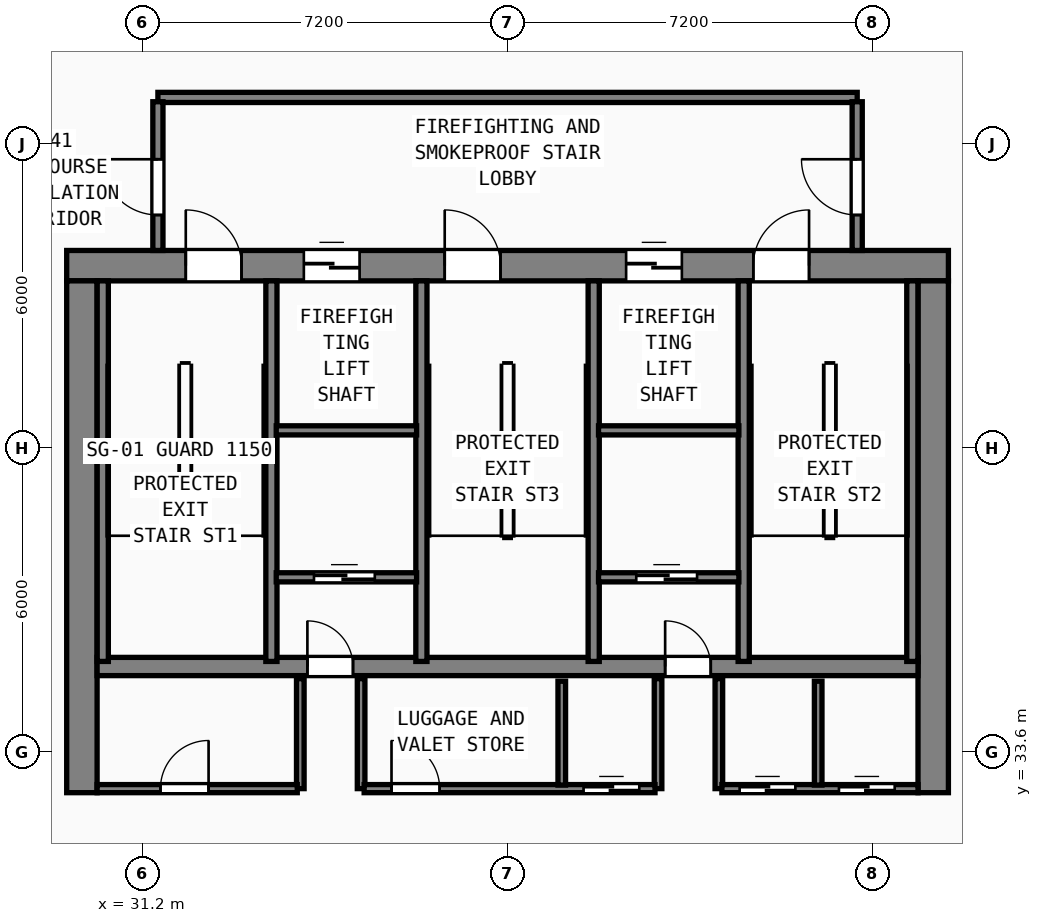
"""IFC4 building model, lengths in metres.
Left out: names, types, materials, properties, quantities, classifications, styles, units other than length and angle.
Written with IfcOpenShell. Run it as: python <this file> out.ifc"""

import sys

from ifc_helpers import new_model, si_unit, direction, frame, frame_2d, origin, place, context, subcontext, project, spatial, rectangle, extrude, element, fill, save


model = new_model("IFC4")
c1 = context("Model", 3, precision=1e-05, world=origin(), true_north=direction((0.0, 1.0)))
c2 = subcontext(c1, "Body", "Model", "MODEL_VIEW")
j1 = project(units=[si_unit("LENGTHUNIT", "METRE"), si_unit("PLANEANGLEUNIT", "RADIAN")], contexts=[c1])
p1 = place(None, origin())
s1 = spatial("IfcSite", under=j1, at=p1, CompositionType="ELEMENT")
p2 = place(p1, origin())
s2 = spatial("IfcBuilding", under=s1, at=p2, CompositionType="ELEMENT")
p3 = place(p2, frame((0.0, 0.0, 164.6)))
s3 = spatial("IfcBuildingStorey", under=s2, at=p3, CompositionType="ELEMENT", Elevation=164.6)
p4 = place(p3, frame((29.7, 43.2, 0.0), z_axis=(0.0, 0.0, 1.0), x_axis=(1.0, 0.0, 0.0)))
e1 = element("IfcWall", 1, at=p4, inside=s3, PredefinedType="SHEAR", context=c2, shape_type="SweptSolid", body=[
    extrude(rectangle(XDim=17.4, YDim=0.6, at=frame_2d((8.7, 0.0))), origin(), (0.0, 0.0, 1.0), 4.22),
])
p5 = place(p4, frame((2.35, 0.0, 0.0)))
e2 = element("IfcOpeningElement", 2, at=p5, cuts=e1, PredefinedType="OPENING", context=c2, shape_type="SweptSolid", body=[
    extrude(rectangle(XDim=1.1, YDim=2.15, at=frame_2d((0.55, 1.075))), frame((0.0, 0.31, 0.0), z_axis=(0.0, -1.0, 0.0), x_axis=(1.0, 0.0, 0.0)), (0.0, 0.0, 1.0), 0.62),
])
p6 = place(p4, frame((7.46, 0.0, 0.0)))
e3 = element("IfcOpeningElement", 3, at=p6, cuts=e1, PredefinedType="OPENING", context=c2, shape_type="SweptSolid", body=[
    extrude(rectangle(XDim=1.1, YDim=2.15, at=frame_2d((0.55, 1.075))), frame((0.0, 0.31, 0.0), z_axis=(0.0, -1.0, 0.0), x_axis=(1.0, 0.0, 0.0)), (0.0, 0.0, 1.0), 0.62),
])
p7 = place(p4, frame((13.55, 0.0, 0.0)))
e4 = element("IfcOpeningElement", 4, at=p7, cuts=e1, PredefinedType="OPENING", context=c2, shape_type="SweptSolid", body=[
    extrude(rectangle(XDim=1.1, YDim=2.15, at=frame_2d((0.55, 1.075))), frame((0.0, 0.31, 0.0), z_axis=(0.0, -1.0, 0.0), x_axis=(1.0, 0.0, 0.0)), (0.0, 0.0, 1.0), 0.62),
])
p8 = place(p4, frame((4.68, 0.0, 0.0)))
e5 = element("IfcOpeningElement", 5, at=p8, cuts=e1, PredefinedType="OPENING", context=c2, shape_type="SweptSolid", body=[
    extrude(rectangle(XDim=1.1, YDim=2.2, at=frame_2d((0.55, 1.1))), frame((0.0, 0.31, 0.0), z_axis=(0.0, -1.0, 0.0), x_axis=(1.0, 0.0, 0.0)), (0.0, 0.0, 1.0), 0.62),
])
p9 = place(p4, frame((11.04, 0.0, 0.0)))
e6 = element("IfcOpeningElement", 6, at=p9, cuts=e1, PredefinedType="OPENING", context=c2, shape_type="SweptSolid", body=[
    extrude(rectangle(XDim=1.1, YDim=2.2, at=frame_2d((0.55, 1.1))), frame((0.0, 0.31, 0.0), z_axis=(0.0, -1.0, 0.0), x_axis=(1.0, 0.0, 0.0)), (0.0, 0.0, 1.0), 0.62),
])
for number, where, z_axis, x_axis in (
    (7, (30.0, 32.8, 0.0), (0.0, 0.0, 1.0), (0.0, 1.0, 0.0)),
    (8, (46.8, 32.8, 0.0), (0.0, 0.0, 1.0), (0.0, 1.0, 0.0)),
):
    element("IfcWall", number, at=place(p3, frame(where, z_axis=z_axis, x_axis=x_axis)), inside=s3, PredefinedType="SHEAR", context=c2, shape_type="SweptSolid", body=[
        extrude(rectangle(XDim=10.1, YDim=0.6, at=frame_2d((5.05, 0.0))), origin(), (0.0, 0.0, 1.0), 4.22),
    ])
p10 = place(p3, frame((30.3, 35.29, 0.0), z_axis=(0.0, 0.0, 1.0), x_axis=(1.0, 0.0, 0.0)))
e9 = element("IfcWall", 9, at=p10, inside=s3, PredefinedType="SHEAR", context=c2, shape_type="SweptSolid", body=[
    extrude(rectangle(XDim=16.2, YDim=0.36, at=frame_2d((8.1, 0.0))), origin(), (0.0, 0.0, 1.0), 4.22),
])
p11 = place(p10, frame((5.05, 0.0, 0.0), z_axis=(0.0, 0.0, 1.0), x_axis=(-1.0, 0.0, 0.0)))
e10 = element("IfcOpeningElement", 10, at=p11, cuts=e9, PredefinedType="OPENING", context=c2, shape_type="SweptSolid", body=[
    extrude(rectangle(XDim=0.9, YDim=2.1, at=frame_2d((0.45, 1.05))), frame((0.0, 0.19, 0.0), z_axis=(0.0, -1.0, 0.0), x_axis=(1.0, 0.0, 0.0)), (0.0, 0.0, 1.0), 0.38),
])
p12 = place(p10, frame((12.11, 0.0, 0.0), z_axis=(0.0, 0.0, 1.0), x_axis=(-1.0, 0.0, 0.0)))
e11 = element("IfcOpeningElement", 11, at=p12, cuts=e9, PredefinedType="OPENING", context=c2, shape_type="SweptSolid", body=[
    extrude(rectangle(XDim=0.9, YDim=2.1, at=frame_2d((0.45, 1.05))), frame((0.0, 0.19, 0.0), z_axis=(0.0, -1.0, 0.0), x_axis=(1.0, 0.0, 0.0)), (0.0, 0.0, 1.0), 0.38),
])
for number, where, z_axis, x_axis in (
    (12, (30.412, 35.39, 0.0), (0.0, 0.0, 1.0), (0.0, 1.0, 0.0)),
    (13, (33.74, 35.39, 0.0), (0.0, 0.0, 1.0), (0.0, 1.0, 0.0)),
    (14, (36.7, 35.39, 0.0), (0.0, 0.0, 1.0), (0.0, 1.0, 0.0)),
    (15, (40.1, 35.39, 0.0), (0.0, 0.0, 1.0), (0.0, 1.0, 0.0)),
    (16, (43.06, 35.39, 0.0), (0.0, 0.0, 1.0), (0.0, 1.0, 0.0)),
    (17, (46.388, 35.39, 0.0), (0.0, 0.0, 1.0), (0.0, 1.0, 0.0)),
):
    element("IfcWall", number, at=place(p3, frame(where, z_axis=z_axis, x_axis=x_axis)), inside=s3, PredefinedType="SHEAR", context=c2, shape_type="SweptSolid", body=[
        extrude(rectangle(XDim=7.51, YDim=0.22, at=frame_2d((3.755, 0.0))), origin(), (0.0, 0.0, 1.0), 4.22),
    ])
p13 = place(p3, frame((31.5, 46.52, 0.0), z_axis=(0.0, 0.0, 1.0), x_axis=(1.0, 0.0, 0.0)))
e18 = element("IfcWall", 18, at=p13, inside=s3, PredefinedType="SOLIDWALL", context=c2, shape_type="SweptSolid", body=[
    extrude(rectangle(XDim=13.8, YDim=0.2, at=frame_2d((6.9, 0.0))), origin(), (0.0, 0.0, 1.0), 4.22),
])
p14 = place(p3, frame((31.5, 43.5, 0.0), z_axis=(0.0, 0.0, 1.0), x_axis=(0.0, 1.0, 0.0)))
e19 = element("IfcWall", 19, at=p14, inside=s3, PredefinedType="SOLIDWALL", context=c2, shape_type="SweptSolid", body=[
    extrude(rectangle(XDim=2.935, YDim=0.2, at=frame_2d((1.468, 0.0))), origin(), (0.0, 0.0, 1.0), 4.22),
])
p15 = place(p14, frame((1.8, 0.0, 0.0), z_axis=(0.0, 0.0, 1.0), x_axis=(-1.0, 0.0, 0.0)))
e20 = element("IfcOpeningElement", 20, at=p15, cuts=e19, PredefinedType="OPENING", context=c2, shape_type="SweptSolid", body=[
    extrude(rectangle(XDim=1.1, YDim=2.15, at=frame_2d((0.55, 1.075))), frame((0.0, 0.11, 0.0), z_axis=(0.0, -1.0, 0.0), x_axis=(1.0, 0.0, 0.0)), (0.0, 0.0, 1.0), 0.22),
])
p16 = place(p3, frame((45.3, 43.5, 0.0), z_axis=(0.0, 0.0, 1.0), x_axis=(0.0, 1.0, 0.0)))
e21 = element("IfcWall", 21, at=p16, inside=s3, PredefinedType="SOLIDWALL", context=c2, shape_type="SweptSolid", body=[
    extrude(rectangle(XDim=2.935, YDim=0.2, at=frame_2d((1.468, 0.0))), origin(), (0.0, 0.0, 1.0), 4.22),
])
p17 = place(p16, frame((0.7, 0.0, 0.0)))
e22 = element("IfcOpeningElement", 22, at=p17, cuts=e21, PredefinedType="OPENING", context=c2, shape_type="SweptSolid", body=[
    extrude(rectangle(XDim=1.1, YDim=2.15, at=frame_2d((0.55, 1.075))), frame((0.0, 0.11, 0.0), z_axis=(0.0, -1.0, 0.0), x_axis=(1.0, 0.0, 0.0)), (0.0, 0.0, 1.0), 0.22),
])
for number, where, z_axis, x_axis in (
    (23, (33.835, 39.95, 0.0), (0.0, 0.0, 1.0), (1.0, 0.0, 0.0)),
    (24, (40.195, 39.95, 0.0), (0.0, 0.0, 1.0), (1.0, 0.0, 0.0)),
):
    element("IfcWall", number, at=place(p3, frame(where, z_axis=z_axis, x_axis=x_axis)), inside=s3, PredefinedType="SOLIDWALL", context=c2, shape_type="SweptSolid", body=[
        extrude(rectangle(XDim=2.77, YDim=0.18, at=frame_2d((1.385, 0.0))), origin(), (0.0, 0.0, 1.0), 4.22),
    ])
p18 = place(p3, frame((33.835, 37.05, 0.0), z_axis=(0.0, 0.0, 1.0), x_axis=(1.0, 0.0, 0.0)))
e25 = element("IfcWall", 25, at=p18, inside=s3, PredefinedType="SOLIDWALL", context=c2, shape_type="SweptSolid", body=[
    extrude(rectangle(XDim=2.77, YDim=0.18, at=frame_2d((1.385, 0.0))), origin(), (0.0, 0.0, 1.0), 4.22),
])
p19 = place(p18, frame((1.945, 0.0, 0.0), z_axis=(0.0, 0.0, 1.0), x_axis=(-1.0, 0.0, 0.0)))
e26 = element("IfcOpeningElement", 26, at=p19, cuts=e25, PredefinedType="OPENING", context=c2, shape_type="SweptSolid", body=[
    extrude(rectangle(XDim=1.2, YDim=2.2, at=frame_2d((0.6, 1.1))), frame((0.0, 0.1, 0.0), z_axis=(0.0, -1.0, 0.0), x_axis=(1.0, 0.0, 0.0)), (0.0, 0.0, 1.0), 0.2),
])
for number, where, z_axis, x_axis in (
    (27, (34.31, 32.88, 0.0), (0.0, 0.0, 1.0), (0.0, 1.0, 0.0)),
    (28, (35.51, 32.88, 0.0), (0.0, 0.0, 1.0), (0.0, 1.0, 0.0)),
):
    element("IfcWall", number, at=place(p3, frame(where, z_axis=z_axis, x_axis=x_axis)), inside=s3, PredefinedType="SOLIDWALL", context=c2, shape_type="SweptSolid", body=[
        extrude(rectangle(XDim=2.17, YDim=0.15, at=frame_2d((1.085, 0.0))), origin(), (0.0, 0.0, 1.0), 4.22),
    ])
p20 = place(p3, frame((40.195, 37.05, 0.0), z_axis=(0.0, 0.0, 1.0), x_axis=(1.0, 0.0, 0.0)))
e29 = element("IfcWall", 29, at=p20, inside=s3, PredefinedType="SOLIDWALL", context=c2, shape_type="SweptSolid", body=[
    extrude(rectangle(XDim=2.77, YDim=0.18, at=frame_2d((1.385, 0.0))), origin(), (0.0, 0.0, 1.0), 4.22),
])
p21 = place(p20, frame((1.945, 0.0, 0.0), z_axis=(0.0, 0.0, 1.0), x_axis=(-1.0, 0.0, 0.0)))
e30 = element("IfcOpeningElement", 30, at=p21, cuts=e29, PredefinedType="OPENING", context=c2, shape_type="SweptSolid", body=[
    extrude(rectangle(XDim=1.2, YDim=2.2, at=frame_2d((0.6, 1.1))), frame((0.0, 0.1, 0.0), z_axis=(0.0, -1.0, 0.0), x_axis=(1.0, 0.0, 0.0)), (0.0, 0.0, 1.0), 0.2),
])
for number, where, z_axis, x_axis in (
    (31, (41.37, 32.88, 0.0), (0.0, 0.0, 1.0), (0.0, 1.0, 0.0)),
    (32, (42.57, 32.88, 0.0), (0.0, 0.0, 1.0), (0.0, 1.0, 0.0)),
):
    element("IfcWall", number, at=place(p3, frame(where, z_axis=z_axis, x_axis=x_axis)), inside=s3, PredefinedType="SOLIDWALL", context=c2, shape_type="SweptSolid", body=[
        extrude(rectangle(XDim=2.17, YDim=0.15, at=frame_2d((1.085, 0.0))), origin(), (0.0, 0.0, 1.0), 4.22),
    ])
p22 = place(p3, frame((30.3, 32.88, 0.0), z_axis=(0.0, 0.0, 1.0), x_axis=(1.0, 0.0, 0.0)))
e33 = element("IfcWall", 33, at=p22, inside=s3, PredefinedType="SOLIDWALL", context=c2, shape_type="SweptSolid", body=[
    extrude(rectangle(XDim=3.95, YDim=0.16, at=frame_2d((1.975, 0.0))), origin(), (0.0, 0.0, 1.0), 4.22),
])
p23 = place(p22, frame((2.2, 0.0, 0.0), z_axis=(0.0, 0.0, 1.0), x_axis=(-1.0, 0.0, 0.0)))
e34 = element("IfcOpeningElement", 34, at=p23, cuts=e33, PredefinedType="OPENING", context=c2, shape_type="SweptSolid", body=[
    extrude(rectangle(XDim=0.95, YDim=2.12, at=frame_2d((0.475, 1.06))), frame((0.0, 0.09, 0.0), z_axis=(0.0, -1.0, 0.0), x_axis=(1.0, 0.0, 0.0)), (0.0, 0.0, 1.0), 0.18),
])
p24 = place(p3, frame((35.57, 32.88, 0.0), z_axis=(0.0, 0.0, 1.0), x_axis=(1.0, 0.0, 0.0)))
e35 = element("IfcWall", 35, at=p24, inside=s3, PredefinedType="SOLIDWALL", context=c2, shape_type="SweptSolid", body=[
    extrude(rectangle(XDim=5.74, YDim=0.16, at=frame_2d((2.87, 0.0))), origin(), (0.0, 0.0, 1.0), 4.22),
])
p25 = place(p24, frame((1.49, 0.0, 0.0), z_axis=(0.0, 0.0, 1.0), x_axis=(-1.0, 0.0, 0.0)))
e36 = element("IfcOpeningElement", 36, at=p25, cuts=e35, PredefinedType="OPENING", context=c2, shape_type="SweptSolid", body=[
    extrude(rectangle(XDim=0.95, YDim=2.12, at=frame_2d((0.475, 1.06))), frame((0.0, 0.09, 0.0), z_axis=(0.0, -1.0, 0.0), x_axis=(1.0, 0.0, 0.0)), (0.0, 0.0, 1.0), 0.18),
])
p26 = place(p24, frame((5.43, 0.0, 0.0), z_axis=(0.0, 0.0, 1.0), x_axis=(-1.0, 0.0, 0.0)))
e37 = element("IfcOpeningElement", 37, at=p26, cuts=e35, PredefinedType="OPENING", context=c2, shape_type="SweptSolid", body=[
    extrude(rectangle(XDim=1.1, YDim=2.2, at=frame_2d((0.55, 1.1))), frame((0.0, 0.09, 0.0), z_axis=(0.0, -1.0, 0.0), x_axis=(1.0, 0.0, 0.0)), (0.0, 0.0, 1.0), 0.18),
])
p27 = place(p3, frame((42.63, 32.88, 0.0), z_axis=(0.0, 0.0, 1.0), x_axis=(1.0, 0.0, 0.0)))
e38 = element("IfcWall", 38, at=p27, inside=s3, PredefinedType="SOLIDWALL", context=c2, shape_type="SweptSolid", body=[
    extrude(rectangle(XDim=3.87, YDim=0.16, at=frame_2d((1.935, 0.0))), origin(), (0.0, 0.0, 1.0), 4.22),
])
p28 = place(p27, frame((1.45, 0.0, 0.0), z_axis=(0.0, 0.0, 1.0), x_axis=(-1.0, 0.0, 0.0)))
e39 = element("IfcOpeningElement", 39, at=p28, cuts=e38, PredefinedType="OPENING", context=c2, shape_type="SweptSolid", body=[
    extrude(rectangle(XDim=1.1, YDim=2.2, at=frame_2d((0.55, 1.1))), frame((0.0, 0.09, 0.0), z_axis=(0.0, -1.0, 0.0), x_axis=(1.0, 0.0, 0.0)), (0.0, 0.0, 1.0), 0.18),
])
p29 = place(p27, frame((3.41, 0.0, 0.0), z_axis=(0.0, 0.0, 1.0), x_axis=(-1.0, 0.0, 0.0)))
e40 = element("IfcOpeningElement", 40, at=p29, cuts=e38, PredefinedType="OPENING", context=c2, shape_type="SweptSolid", body=[
    extrude(rectangle(XDim=1.1, YDim=2.2, at=frame_2d((0.55, 1.1))), frame((0.0, 0.09, 0.0), z_axis=(0.0, -1.0, 0.0), x_axis=(1.0, 0.0, 0.0)), (0.0, 0.0, 1.0), 0.18),
])
for number, where, z_axis, x_axis in (
    (41, (39.47, 32.95, 0.0), (0.0, 0.0, 1.0), (0.0, 1.0, 0.0)),
    (42, (44.53, 32.95, 0.0), (0.0, 0.0, 1.0), (0.0, 1.0, 0.0)),
):
    element("IfcWall", number, at=place(p3, frame(where, z_axis=z_axis, x_axis=x_axis)), inside=s3, PredefinedType="SOLIDWALL", context=c2, shape_type="SweptSolid", body=[
        extrude(rectangle(XDim=2.05, YDim=0.15, at=frame_2d((1.025, 0.0))), origin(), (0.0, 0.0, 1.0), 4.22),
    ])
p30 = place(p5, origin())
e43 = element("IfcDoor", 43, at=p30, inside=s3, OperationType="SINGLE_SWING_LEFT", PredefinedType="DOOR", context=c2, shape_type="SweptSolid", body=[
    extrude(rectangle(XDim=1.1, YDim=2.15, at=frame_2d((0.55, 1.075))), frame((0.0, 0.185, 0.0), z_axis=(0.0, -1.0, 0.0), x_axis=(1.0, 0.0, 0.0)), (0.0, 0.0, 1.0), 0.05),
])
fill(e2, e43)
p31 = place(p6, origin())
e44 = element("IfcDoor", 44, at=p31, inside=s3, OperationType="SINGLE_SWING_LEFT", PredefinedType="DOOR", context=c2, shape_type="SweptSolid", body=[
    extrude(rectangle(XDim=1.1, YDim=2.15, at=frame_2d((0.55, 1.075))), frame((0.0, 0.185, 0.0), z_axis=(0.0, -1.0, 0.0), x_axis=(1.0, 0.0, 0.0)), (0.0, 0.0, 1.0), 0.05),
])
fill(e3, e44)
p32 = place(p7, origin())
e45 = element("IfcDoor", 45, at=p32, inside=s3, OperationType="SINGLE_SWING_RIGHT", PredefinedType="DOOR", context=c2, shape_type="SweptSolid", body=[
    extrude(rectangle(XDim=1.1, YDim=2.15, at=frame_2d((0.55, 1.075))), frame((0.0, 0.185, 0.0), z_axis=(0.0, -1.0, 0.0), x_axis=(1.0, 0.0, 0.0)), (0.0, 0.0, 1.0), 0.05),
])
fill(e4, e45)
p33 = place(p15, origin())
e46 = element("IfcDoor", 46, at=p33, inside=s3, OperationType="SINGLE_SWING_LEFT", PredefinedType="DOOR", context=c2, shape_type="SweptSolid", body=[
    extrude(rectangle(XDim=1.1, YDim=2.15, at=frame_2d((0.55, 1.075))), frame((0.0, 0.025, 0.0), z_axis=(0.0, -1.0, 0.0), x_axis=(1.0, 0.0, 0.0)), (0.0, 0.0, 1.0), 0.05),
])
fill(e20, e46)
p34 = place(p17, origin())
e47 = element("IfcDoor", 47, at=p34, inside=s3, OperationType="SINGLE_SWING_RIGHT", PredefinedType="DOOR", context=c2, shape_type="SweptSolid", body=[
    extrude(rectangle(XDim=1.1, YDim=2.15, at=frame_2d((0.55, 1.075))), frame((0.0, 0.025, 0.0), z_axis=(0.0, -1.0, 0.0), x_axis=(1.0, 0.0, 0.0)), (0.0, 0.0, 1.0), 0.05),
])
fill(e22, e47)
p35 = place(p8, origin())
e48 = element("IfcDoor", 48, at=p35, inside=s3, OperationType="SLIDING_TO_LEFT", PredefinedType="DOOR", context=c2, shape_type="SweptSolid", body=[
    extrude(rectangle(XDim=1.1, YDim=2.2, at=frame_2d((0.55, 1.1))), frame((0.0, 0.185, 0.0), z_axis=(0.0, -1.0, 0.0), x_axis=(1.0, 0.0, 0.0)), (0.0, 0.0, 1.0), 0.05),
])
fill(e5, e48)
p36 = place(p9, origin())
e49 = element("IfcDoor", 49, at=p36, inside=s3, OperationType="SLIDING_TO_LEFT", PredefinedType="DOOR", context=c2, shape_type="SweptSolid", body=[
    extrude(rectangle(XDim=1.1, YDim=2.2, at=frame_2d((0.55, 1.1))), frame((0.0, 0.185, 0.0), z_axis=(0.0, -1.0, 0.0), x_axis=(1.0, 0.0, 0.0)), (0.0, 0.0, 1.0), 0.05),
])
fill(e6, e49)
p37 = place(p19, origin())
e50 = element("IfcDoor", 50, at=p37, inside=s3, OperationType="SLIDING_TO_RIGHT", PredefinedType="DOOR", context=c2, shape_type="SweptSolid", body=[
    extrude(rectangle(XDim=1.2, YDim=2.2, at=frame_2d((0.6, 1.1))), frame((0.0, 0.025, 0.0), z_axis=(0.0, -1.0, 0.0), x_axis=(1.0, 0.0, 0.0)), (0.0, 0.0, 1.0), 0.05),
])
fill(e26, e50)
p38 = place(p11, origin())
e51 = element("IfcDoor", 51, at=p38, inside=s3, OperationType="SINGLE_SWING_RIGHT", PredefinedType="DOOR", context=c2, shape_type="SweptSolid", body=[
    extrude(rectangle(XDim=0.9, YDim=2.1, at=frame_2d((0.45, 1.05))), frame((0.0, 0.025, 0.0), z_axis=(0.0, -1.0, 0.0), x_axis=(1.0, 0.0, 0.0)), (0.0, 0.0, 1.0), 0.05),
])
fill(e10, e51)
p39 = place(p21, origin())
e52 = element("IfcDoor", 52, at=p39, inside=s3, OperationType="SLIDING_TO_RIGHT", PredefinedType="DOOR", context=c2, shape_type="SweptSolid", body=[
    extrude(rectangle(XDim=1.2, YDim=2.2, at=frame_2d((0.6, 1.1))), frame((0.0, 0.025, 0.0), z_axis=(0.0, -1.0, 0.0), x_axis=(1.0, 0.0, 0.0)), (0.0, 0.0, 1.0), 0.05),
])
fill(e30, e52)
p40 = place(p12, origin())
e53 = element("IfcDoor", 53, at=p40, inside=s3, OperationType="SINGLE_SWING_RIGHT", PredefinedType="DOOR", context=c2, shape_type="SweptSolid", body=[
    extrude(rectangle(XDim=0.9, YDim=2.1, at=frame_2d((0.45, 1.05))), frame((0.0, 0.025, 0.0), z_axis=(0.0, -1.0, 0.0), x_axis=(1.0, 0.0, 0.0)), (0.0, 0.0, 1.0), 0.05),
])
fill(e11, e53)
p41 = place(p23, origin())
e54 = element("IfcDoor", 54, at=p41, inside=s3, OperationType="SINGLE_SWING_LEFT", PredefinedType="DOOR", context=c2, shape_type="SweptSolid", body=[
    extrude(rectangle(XDim=0.95, YDim=2.12, at=frame_2d((0.475, 1.06))), frame((0.0, 0.025, 0.0), z_axis=(0.0, -1.0, 0.0), x_axis=(1.0, 0.0, 0.0)), (0.0, 0.0, 1.0), 0.05),
])
fill(e34, e54)
p42 = place(p25, origin())
e55 = element("IfcDoor", 55, at=p42, inside=s3, OperationType="SINGLE_SWING_RIGHT", PredefinedType="DOOR", context=c2, shape_type="SweptSolid", body=[
    extrude(rectangle(XDim=0.95, YDim=2.12, at=frame_2d((0.475, 1.06))), frame((0.0, 0.025, 0.0), z_axis=(0.0, -1.0, 0.0), x_axis=(1.0, 0.0, 0.0)), (0.0, 0.0, 1.0), 0.05),
])
fill(e36, e55)
p43 = place(p26, origin())
e56 = element("IfcDoor", 56, at=p43, inside=s3, OperationType="SLIDING_TO_RIGHT", PredefinedType="DOOR", context=c2, shape_type="SweptSolid", body=[
    extrude(rectangle(XDim=1.1, YDim=2.2, at=frame_2d((0.55, 1.1))), frame((0.0, 0.025, 0.0), z_axis=(0.0, -1.0, 0.0), x_axis=(1.0, 0.0, 0.0)), (0.0, 0.0, 1.0), 0.05),
])
fill(e37, e56)
p44 = place(p28, origin())
e57 = element("IfcDoor", 57, at=p44, inside=s3, OperationType="SLIDING_TO_RIGHT", PredefinedType="DOOR", context=c2, shape_type="SweptSolid", body=[
    extrude(rectangle(XDim=1.1, YDim=2.2, at=frame_2d((0.55, 1.1))), frame((0.0, 0.025, 0.0), z_axis=(0.0, -1.0, 0.0), x_axis=(1.0, 0.0, 0.0)), (0.0, 0.0, 1.0), 0.05),
])
fill(e39, e57)
p45 = place(p29, origin())
e58 = element("IfcDoor", 58, at=p45, inside=s3, OperationType="SLIDING_TO_RIGHT", PredefinedType="DOOR", context=c2, shape_type="SweptSolid", body=[
    extrude(rectangle(XDim=1.1, YDim=2.2, at=frame_2d((0.55, 1.1))), frame((0.0, 0.025, 0.0), z_axis=(0.0, -1.0, 0.0), x_axis=(1.0, 0.0, 0.0)), (0.0, 0.0, 1.0), 0.05),
])
fill(e40, e58)
save(model, sys.argv[1])
